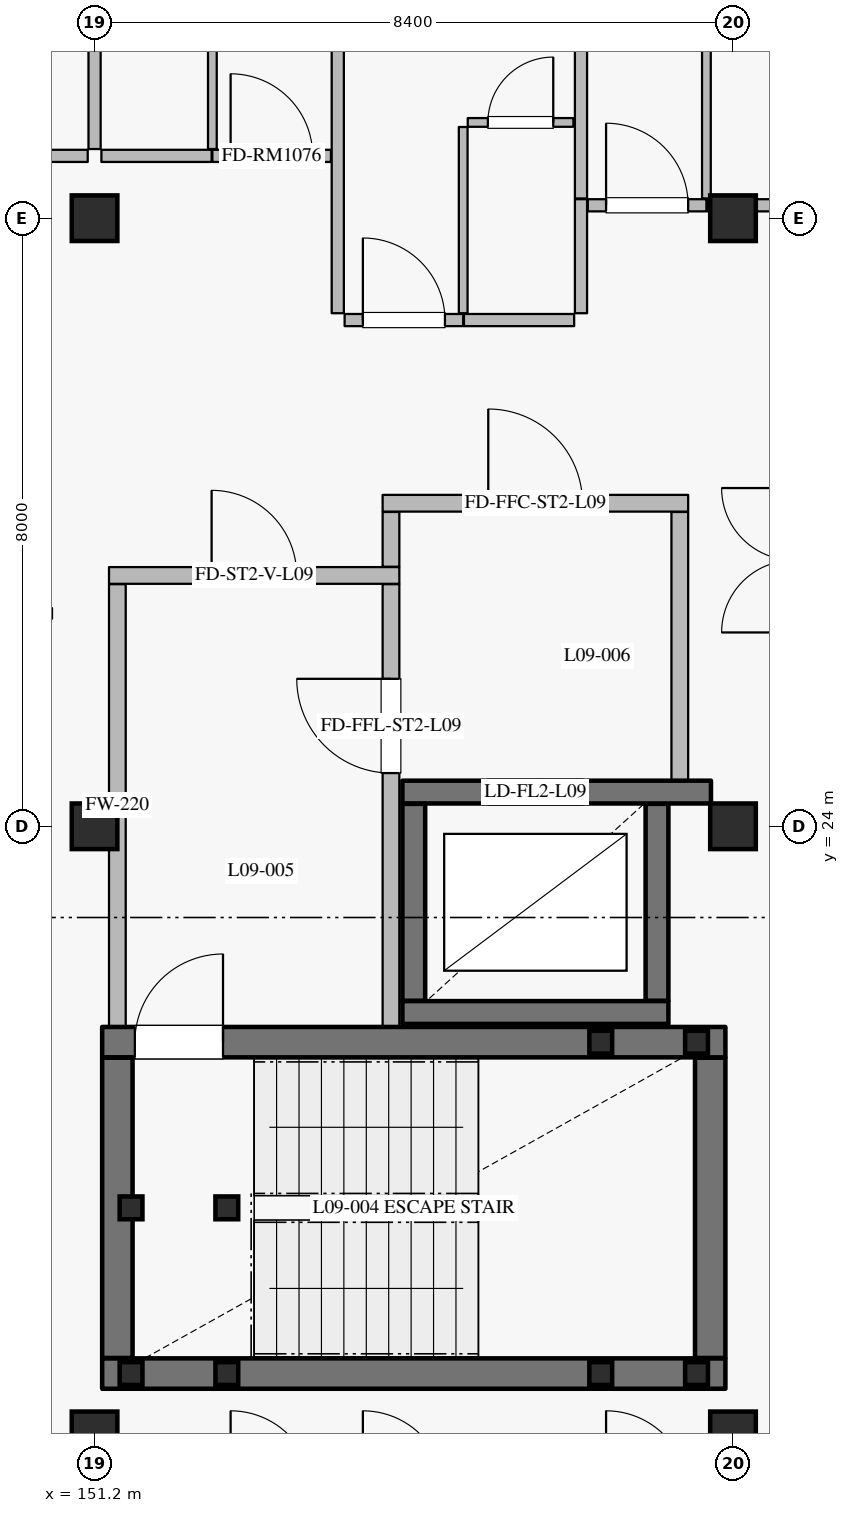
"""IFC4 building model, lengths in metres.
Left out: names, types, materials, properties, quantities, classifications, styles, units other than length and angle.
Written with IfcOpenShell. Run it as: python <this file> out.ifc"""

import sys

from ifc_helpers import new_model, si_unit, direction, frame, frame_2d, origin, origin_2d, place, context, subcontext, project, spatial, rectangle, hollow_rectangle, extrude, element, fill, save


model = new_model("IFC4")
c1 = context("Model", 3, precision=1e-05, world=origin(), true_north=direction((0.0, 1.0)))
c2 = subcontext(c1, "Body", "Model", "MODEL_VIEW")
j1 = project(units=[si_unit("LENGTHUNIT", "METRE"), si_unit("PLANEANGLEUNIT", "RADIAN")], contexts=[c1])
p1 = place(None, origin())
s1 = spatial("IfcSite", under=j1, at=p1, CompositionType="ELEMENT")
p2 = place(p1, origin())
s2 = spatial("IfcBuilding", under=s1, at=p2, CompositionType="ELEMENT")
p3 = place(p2, frame((0.0, 0.0, 39.6)))
s3 = spatial("IfcBuildingStorey", under=s2, at=p3, CompositionType="ELEMENT", Elevation=39.6)
for number, where, z_axis, x_axis in (
    (1, (151.2, 24.0, 0.0), (0.0, 0.0, 1.0), (1.0, 0.0, 0.0)),
    (2, (159.6, 24.0, 0.0), (0.0, 0.0, 1.0), (1.0, 0.0, 0.0)),
    (3, (151.2, 16.0, 0.0), (0.0, 0.0, 1.0), (1.0, 0.0, 0.0)),
    (4, (151.2, 32.0, 0.0), (0.0, 0.0, 1.0), (1.0, 0.0, 0.0)),
    (5, (159.6, 16.0, 0.0), (0.0, 0.0, 1.0), (1.0, 0.0, 0.0)),
    (6, (159.6, 32.0, 0.0), (0.0, 0.0, 1.0), (1.0, 0.0, 0.0)),
):
    element("IfcColumn", number, at=place(p3, frame(where, z_axis=z_axis, x_axis=x_axis)), inside=s3, PredefinedType="COLUMN", context=c2, shape_type="SweptSolid", body=[
        extrude(rectangle(XDim=0.6, YDim=0.6, at=origin_2d()), origin(), (0.0, 0.0, 1.0), 3.6),
    ])
p4 = place(p3, frame((143.1, 32.286, 0.0), z_axis=(0.0, 0.0, 1.0), x_axis=(0.724145477467, 0.689647248573, 0.0)))
e7 = element("IfcWall", 7, at=p4, inside=s3, PredefinedType="SOLIDWALL", context=c2, shape_type="SweptSolid", body=[
    extrude(rectangle(XDim=10.771, YDim=0.24, at=frame_2d((5.385, 0.0))), origin(), (0.0, 0.0, 1.0), 2.94),
])
p5 = place(p4, frame((0.194, 0.0, 0.8)))
e8 = element("IfcOpeningElement", 8, at=p5, cuts=e7, PredefinedType="OPENING", context=c2, shape_type="SweptSolid", body=[
    extrude(rectangle(XDim=1.6, YDim=1.6, at=frame_2d((0.8, 0.8))), frame((0.0, 0.13, 0.0), z_axis=(0.0, -1.0, 0.0), x_axis=(1.0, 0.0, 0.0)), (0.0, 0.0, 1.0), 0.26),
])
p6 = place(p4, frame((3.591, 0.0, 0.8)))
e9 = element("IfcOpeningElement", 9, at=p6, cuts=e7, PredefinedType="OPENING", context=c2, shape_type="SweptSolid", body=[
    extrude(rectangle(XDim=1.6, YDim=1.6, at=frame_2d((0.8, 0.8))), frame((0.0, 0.13, 0.0), z_axis=(0.0, -1.0, 0.0), x_axis=(1.0, 0.0, 0.0)), (0.0, 0.0, 1.0), 0.26),
])
p7 = place(p4, frame((7.983, 0.0, 0.8)))
e10 = element("IfcOpeningElement", 10, at=p7, cuts=e7, PredefinedType="OPENING", context=c2, shape_type="SweptSolid", body=[
    extrude(rectangle(XDim=1.6, YDim=1.6, at=frame_2d((0.8, 0.8))), frame((0.0, 0.13, 0.0), z_axis=(0.0, -1.0, 0.0), x_axis=(1.0, 0.0, 0.0)), (0.0, 0.0, 1.0), 0.26),
])
p8 = place(p3, frame((155.25, 21.55, 0.0), z_axis=(0.0, 0.0, 1.0), x_axis=(1.0, 0.0, 0.0)))
e11 = element("IfcWall", 11, at=p8, inside=s3, PredefinedType="SHEAR", context=c2, shape_type="SweptSolid", body=[
    extrude(rectangle(XDim=3.5, YDim=0.3, at=frame_2d((1.75, 0.0))), origin(), (0.0, 0.0, 1.0), 3.335),
])
p9 = place(p3, frame((158.6, 21.705, 0.0), z_axis=(0.0, 0.0, 1.0), x_axis=(0.0, 1.0, 0.0)))
e12 = element("IfcWall", 12, at=p9, inside=s3, PredefinedType="SHEAR", context=c2, shape_type="SweptSolid", body=[
    extrude(rectangle(XDim=2.59, YDim=0.3, at=frame_2d((1.295, 0.0))), origin(), (0.0, 0.0, 1.0), 3.335),
])
p10 = place(p3, frame((159.31, 24.45, 0.0), z_axis=(0.0, 0.0, 1.0), x_axis=(-1.0, 0.0, 0.0)))
e13 = element("IfcWall", 13, at=p10, inside=s3, PredefinedType="SHEAR", context=c2, shape_type="SweptSolid", body=[
    extrude(rectangle(XDim=4.06, YDim=0.3, at=frame_2d((2.03, 0.0))), origin(), (0.0, 0.0, 1.0), 3.335),
])
p11 = place(p10, frame((1.685, 0.0, 0.0)))
e14 = element("IfcOpeningElement", 14, at=p11, cuts=e13, PredefinedType="OPENING", context=c2, shape_type="SweptSolid", body=[
    extrude(rectangle(XDim=1.25, YDim=2.25, at=frame_2d((0.625, 1.125))), frame((0.0, 0.16, 0.0), z_axis=(0.0, -1.0, 0.0), x_axis=(1.0, 0.0, 0.0)), (0.0, 0.0, 1.0), 0.32),
])
p12 = place(p3, frame((155.4, 24.295, 0.0), z_axis=(0.0, 0.0, 1.0), x_axis=(0.0, -1.0, 0.0)))
e15 = element("IfcWall", 15, at=p12, inside=s3, PredefinedType="SHEAR", context=c2, shape_type="SweptSolid", body=[
    extrude(rectangle(XDim=2.59, YDim=0.3, at=frame_2d((1.295, 0.0))), origin(), (0.0, 0.0, 1.0), 3.335),
])
p13 = place(p3, frame((151.3, 16.8, 0.0), z_axis=(0.0, 0.0, 1.0), x_axis=(1.0, 0.0, 0.0)))
e16 = element("IfcWall", 16, at=p13, inside=s3, PredefinedType="SHEAR", context=c2, shape_type="SweptSolid", body=[
    extrude(rectangle(XDim=8.2, YDim=0.4, at=frame_2d((4.1, 0.0))), origin(), (0.0, 0.0, 1.0), 3.335),
])
p14 = place(p3, frame((159.3, 17.005, 0.0), z_axis=(0.0, 0.0, 1.0), x_axis=(0.0, 1.0, 0.0)))
e17 = element("IfcWall", 17, at=p14, inside=s3, PredefinedType="SHEAR", context=c2, shape_type="SweptSolid", body=[
    extrude(rectangle(XDim=3.95, YDim=0.4, at=frame_2d((1.975, 0.0))), origin(), (0.0, 0.0, 1.0), 3.335),
])
p15 = place(p3, frame((151.3, 21.16, 0.0), z_axis=(0.0, 0.0, 1.0), x_axis=(1.0, 0.0, 0.0)))
e18 = element("IfcWall", 18, at=p15, inside=s3, PredefinedType="SHEAR", context=c2, shape_type="SweptSolid", body=[
    extrude(rectangle(XDim=8.2, YDim=0.4, at=frame_2d((4.1, 0.0))), origin(), (0.0, 0.0, 1.0), 3.335),
])
p16 = place(p15, frame((0.43, 0.0, 0.0)))
e19 = element("IfcOpeningElement", 19, at=p16, cuts=e18, PredefinedType="OPENING", context=c2, shape_type="SweptSolid", body=[
    extrude(rectangle(XDim=1.16, YDim=2.2, at=frame_2d((0.58, 1.1))), frame((0.0, 0.21, 0.0), z_axis=(0.0, -1.0, 0.0), x_axis=(1.0, 0.0, 0.0)), (0.0, 0.0, 1.0), 0.42),
])
p17 = place(p3, frame((151.5, 17.005, 0.0), z_axis=(0.0, 0.0, 1.0), x_axis=(0.0, 1.0, 0.0)))
e20 = element("IfcWall", 20, at=p17, inside=s3, PredefinedType="SHEAR", context=c2, shape_type="SweptSolid", body=[
    extrude(rectangle(XDim=3.95, YDim=0.4, at=frame_2d((1.975, 0.0))), origin(), (0.0, 0.0, 1.0), 3.335),
])
p18 = place(p3, frame((151.5, 21.365, 0.0), z_axis=(0.0, 0.0, 1.0), x_axis=(0.0, 1.0, 0.0)))
e21 = element("IfcWall", 21, at=p18, inside=s3, PredefinedType="PARTITIONING", context=c2, shape_type="SweptSolid", body=[
    extrude(rectangle(XDim=5.82, YDim=0.22, at=frame_2d((2.91, 0.0))), origin(), (0.0, 0.0, 1.0), 3.335),
])
p19 = place(p3, frame((151.39, 27.3, 0.0), z_axis=(0.0, 0.0, 1.0), x_axis=(1.0, 0.0, 0.0)))
e22 = element("IfcWall", 22, at=p19, inside=s3, PredefinedType="PARTITIONING", context=c2, shape_type="SweptSolid", body=[
    extrude(rectangle(XDim=3.82, YDim=0.22, at=frame_2d((1.91, 0.0))), origin(), (0.0, 0.0, 1.0), 3.335),
])
p20 = place(p19, frame((1.35, 0.0, 0.0)))
e23 = element("IfcOpeningElement", 23, at=p20, cuts=e22, PredefinedType="OPENING", context=c2, shape_type="SweptSolid", body=[
    extrude(rectangle(XDim=1.12, YDim=2.2, at=frame_2d((0.56, 1.1))), frame((0.0, 0.12, 0.0), z_axis=(0.0, -1.0, 0.0), x_axis=(1.0, 0.0, 0.0)), (0.0, 0.0, 1.0), 0.24),
])
p21 = place(p3, frame((155.1, 21.365, 0.0), z_axis=(0.0, 0.0, 1.0), x_axis=(0.0, 1.0, 0.0)))
e24 = element("IfcWall", 24, at=p21, inside=s3, PredefinedType="PARTITIONING", context=c2, shape_type="SweptSolid", body=[
    extrude(rectangle(XDim=5.82, YDim=0.22, at=frame_2d((2.91, 0.0))), origin(), (0.0, 0.0, 1.0), 3.335),
])
p22 = place(p21, frame((3.335, 0.0, 0.0)))
e25 = element("IfcOpeningElement", 25, at=p22, cuts=e24, PredefinedType="OPENING", context=c2, shape_type="SweptSolid", body=[
    extrude(rectangle(XDim=1.24, YDim=2.2, at=frame_2d((0.62, 1.1))), frame((0.0, 0.12, 0.0), z_axis=(0.0, -1.0, 0.0), x_axis=(1.0, 0.0, 0.0)), (0.0, 0.0, 1.0), 0.24),
])
p23 = place(p3, frame((155.1, 27.415, 0.0), z_axis=(0.0, 0.0, 1.0), x_axis=(0.0, 1.0, 0.0)))
e26 = element("IfcWall", 26, at=p23, inside=s3, PredefinedType="PARTITIONING", context=c2, shape_type="SweptSolid", body=[
    extrude(rectangle(XDim=0.72, YDim=0.22, at=frame_2d((0.36, 0.0))), origin(), (0.0, 0.0, 1.0), 3.335),
])
p24 = place(p3, frame((158.9, 24.605, 0.0), z_axis=(0.0, 0.0, 1.0), x_axis=(0.0, 1.0, 0.0)))
e27 = element("IfcWall", 27, at=p24, inside=s3, PredefinedType="PARTITIONING", context=c2, shape_type="SweptSolid", body=[
    extrude(rectangle(XDim=3.53, YDim=0.22, at=frame_2d((1.765, 0.0))), origin(), (0.0, 0.0, 1.0), 3.335),
])
p25 = place(p3, frame((154.99, 28.25, 0.0), z_axis=(0.0, 0.0, 1.0), x_axis=(1.0, 0.0, 0.0)))
e28 = element("IfcWall", 28, at=p25, inside=s3, PredefinedType="PARTITIONING", context=c2, shape_type="SweptSolid", body=[
    extrude(rectangle(XDim=4.02, YDim=0.22, at=frame_2d((2.01, 0.0))), origin(), (0.0, 0.0, 1.0), 3.335),
])
p26 = place(p25, frame((1.39, 0.0, 0.0)))
e29 = element("IfcOpeningElement", 29, at=p26, cuts=e28, PredefinedType="OPENING", context=c2, shape_type="SweptSolid", body=[
    extrude(rectangle(XDim=1.24, YDim=2.2, at=frame_2d((0.62, 1.1))), frame((0.0, 0.12, 0.0), z_axis=(0.0, -1.0, 0.0), x_axis=(1.0, 0.0, 0.0)), (0.0, 0.0, 1.0), 0.24),
])
for number, where, z_axis, x_axis in (
    (30, (151.68, 16.8, 0.0), (0.0, 0.0, 1.0), (1.0, 0.0, 0.0)),
    (31, (151.68, 18.98, 0.0), (0.0, 0.0, 1.0), (1.0, 0.0, 0.0)),
    (32, (152.94, 16.8, 0.0), (0.0, 0.0, 1.0), (1.0, 0.0, 0.0)),
    (33, (152.94, 18.98, 0.0), (0.0, 0.0, 1.0), (1.0, 0.0, 0.0)),
    (34, (157.86, 16.8, -1.8), (0.0, 0.0, 1.0), (1.0, 0.0, 0.0)),
    (35, (157.86, 21.16, -1.8), (0.0, 0.0, 1.0), (1.0, 0.0, 0.0)),
    (36, (159.12, 16.8, -1.8), (0.0, 0.0, 1.0), (1.0, 0.0, 0.0)),
    (37, (159.12, 21.16, -1.8), (0.0, 0.0, 1.0), (1.0, 0.0, 0.0)),
):
    element("IfcColumn", number, at=place(p3, frame(where, z_axis=z_axis, x_axis=x_axis)), inside=s3, PredefinedType="COLUMN", context=c2, shape_type="SweptSolid", body=[
        extrude(hollow_rectangle(XDim=0.3, YDim=0.3, WallThickness=0.012, at=origin_2d()), origin(), (0.0, 0.0, 1.0), 3.42),
    ])
p27 = place(p3, frame((149.64, 32.82, 0.0), z_axis=(0.0, 0.0, 1.0), x_axis=(1.0, 0.0, 0.0)))
e38 = element("IfcWall", 38, at=p27, inside=s3, PredefinedType="PARTITIONING", context=c2, shape_type="SweptSolid", body=[
    extrude(rectangle(XDim=1.47, YDim=0.16, at=frame_2d((0.735, 0.0))), origin(), (0.0, 0.0, 1.0), 3.335),
])
p28 = place(p3, frame((151.29, 32.82, 0.0), z_axis=(0.0, 0.0, 1.0), x_axis=(1.0, 0.0, 0.0)))
e39 = element("IfcWall", 39, at=p28, inside=s3, PredefinedType="PARTITIONING", context=c2, shape_type="SweptSolid", body=[
    extrude(rectangle(XDim=1.45, YDim=0.16, at=frame_2d((0.725, 0.0))), origin(), (0.0, 0.0, 1.0), 3.335),
])
p29 = place(p3, frame((152.75, 32.82, 0.0), z_axis=(0.0, 0.0, 1.0), x_axis=(1.0, 0.0, 0.0)))
e40 = element("IfcWall", 40, at=p29, inside=s3, PredefinedType="PARTITIONING", context=c2, shape_type="SweptSolid", body=[
    extrude(rectangle(XDim=1.56, YDim=0.16, at=frame_2d((0.78, 0.0))), origin(), (0.0, 0.0, 1.0), 3.335),
])
p30 = place(p29, frame((0.24, 0.0, 0.0)))
e41 = element("IfcOpeningElement", 41, at=p30, cuts=e40, PredefinedType="OPENING", context=c2, shape_type="SweptSolid", body=[
    extrude(rectangle(XDim=1.08, YDim=2.3, at=frame_2d((0.54, 1.15))), frame((0.0, 0.09, 0.0), z_axis=(0.0, -1.0, 0.0), x_axis=(1.0, 0.0, 0.0)), (0.0, 0.0, 1.0), 0.18),
])
p31 = place(p3, frame((152.75, 32.91, 0.0), z_axis=(0.0, 0.0, 1.0), x_axis=(0.0, 1.0, 0.0)))
e42 = element("IfcWall", 42, at=p31, inside=s3, PredefinedType="PARTITIONING", context=c2, shape_type="SweptSolid", body=[
    extrude(rectangle(XDim=2.45, YDim=0.115, at=frame_2d((1.225, 0.0))), origin(), (0.0, 0.0, 1.0), 3.335),
])
p32 = place(p3, frame((151.2, 32.91, 0.0), z_axis=(0.0, 0.0, 1.0), x_axis=(0.0, 1.0, 0.0)))
e43 = element("IfcWall", 43, at=p32, inside=s3, PredefinedType="PARTITIONING", context=c2, shape_type="SweptSolid", body=[
    extrude(rectangle(XDim=6.75, YDim=0.16, at=frame_2d((3.375, 0.0))), origin(), (0.0, 0.0, 1.0), 2.74),
])
p33 = place(p3, frame((154.49, 30.66, 0.0), z_axis=(0.0, 0.0, 1.0), x_axis=(1.0, 0.0, 0.0)))
e44 = element("IfcWall", 44, at=p33, inside=s3, PredefinedType="PARTITIONING", context=c2, shape_type="SweptSolid", body=[
    extrude(rectangle(XDim=1.56, YDim=0.16, at=frame_2d((0.78, 0.0))), origin(), (0.0, 0.0, 1.0), 3.335),
])
p34 = place(p33, frame((0.24, 0.0, 0.0)))
e45 = element("IfcOpeningElement", 45, at=p34, cuts=e44, PredefinedType="OPENING", context=c2, shape_type="SweptSolid", body=[
    extrude(rectangle(XDim=1.08, YDim=2.3, at=frame_2d((0.54, 1.15))), frame((0.0, 0.09, 0.0), z_axis=(0.0, -1.0, 0.0), x_axis=(1.0, 0.0, 0.0)), (0.0, 0.0, 1.0), 0.18),
])
p35 = place(p3, frame((156.06, 30.66, 0.0), z_axis=(0.0, 0.0, 1.0), x_axis=(1.0, 0.0, 0.0)))
e46 = element("IfcWall", 46, at=p35, inside=s3, PredefinedType="PARTITIONING", context=c2, shape_type="SweptSolid", body=[
    extrude(rectangle(XDim=1.45, YDim=0.16, at=frame_2d((0.725, 0.0))), origin(), (0.0, 0.0, 1.0), 3.335),
])
p36 = place(p3, frame((156.05, 30.75, 0.0), z_axis=(0.0, 0.0, 1.0), x_axis=(0.0, 1.0, 0.0)))
e47 = element("IfcWall", 47, at=p36, inside=s3, PredefinedType="PARTITIONING", context=c2, shape_type="SweptSolid", body=[
    extrude(rectangle(XDim=2.45, YDim=0.115, at=frame_2d((1.225, 0.0))), origin(), (0.0, 0.0, 1.0), 3.335),
])
p37 = place(p3, frame((156.11, 33.26, 0.0), z_axis=(0.0, 0.0, 1.0), x_axis=(1.0, 0.0, 0.0)))
e48 = element("IfcWall", 48, at=p37, inside=s3, PredefinedType="PARTITIONING", context=c2, shape_type="SweptSolid", body=[
    extrude(rectangle(XDim=1.39, YDim=0.115, at=frame_2d((0.695, 0.0))), origin(), (0.0, 0.0, 1.0), 3.335),
])
p38 = place(p37, frame((0.265, 0.0, 0.0)))
e49 = element("IfcOpeningElement", 49, at=p38, cuts=e48, PredefinedType="OPENING", context=c2, shape_type="SweptSolid", body=[
    extrude(rectangle(XDim=0.86, YDim=2.12, at=frame_2d((0.43, 1.06))), frame((0.0, 0.067, 0.0), z_axis=(0.0, -1.0, 0.0), x_axis=(1.0, 0.0, 0.0)), (0.0, 0.0, 1.0), 0.135),
])
p39 = place(p3, frame((154.4, 30.75, 0.0), z_axis=(0.0, 0.0, 1.0), x_axis=(0.0, 1.0, 0.0)))
e50 = element("IfcWall", 50, at=p39, inside=s3, PredefinedType="PARTITIONING", context=c2, shape_type="SweptSolid", body=[
    extrude(rectangle(XDim=8.91, YDim=0.16, at=frame_2d((4.455, 0.0))), origin(), (0.0, 0.0, 1.0), 3.335),
])
p40 = place(p3, frame((157.6, 30.75, 0.0), z_axis=(0.0, 0.0, 1.0), x_axis=(0.0, 1.0, 0.0)))
e51 = element("IfcWall", 51, at=p40, inside=s3, PredefinedType="PARTITIONING", context=c2, shape_type="SweptSolid", body=[
    extrude(rectangle(XDim=1.5, YDim=0.16, at=frame_2d((0.75, 0.0))), origin(), (0.0, 0.0, 1.0), 3.335),
])
p41 = place(p3, frame((157.69, 32.17, 0.0), z_axis=(0.0, 0.0, 1.0), x_axis=(1.0, 0.0, 0.0)))
e52 = element("IfcWall", 52, at=p41, inside=s3, PredefinedType="PARTITIONING", context=c2, shape_type="SweptSolid", body=[
    extrude(rectangle(XDim=1.56, YDim=0.16, at=frame_2d((0.78, 0.0))), origin(), (0.0, 0.0, 1.0), 2.84),
])
p42 = place(p41, frame((0.24, 0.0, 0.0)))
e53 = element("IfcOpeningElement", 53, at=p42, cuts=e52, PredefinedType="OPENING", context=c2, shape_type="SweptSolid", body=[
    extrude(rectangle(XDim=1.08, YDim=2.3, at=frame_2d((0.54, 1.15))), frame((0.0, 0.09, 0.0), z_axis=(0.0, -1.0, 0.0), x_axis=(1.0, 0.0, 0.0)), (0.0, 0.0, 1.0), 0.18),
])
p43 = place(p3, frame((159.26, 32.17, 0.0), z_axis=(0.0, 0.0, 1.0), x_axis=(1.0, 0.0, 0.0)))
e54 = element("IfcWall", 54, at=p43, inside=s3, PredefinedType="PARTITIONING", context=c2, shape_type="SweptSolid", body=[
    extrude(rectangle(XDim=1.45, YDim=0.16, at=frame_2d((0.725, 0.0))), origin(), (0.0, 0.0, 1.0), 3.335),
])
p44 = place(p3, frame((159.25, 32.26, 0.0), z_axis=(0.0, 0.0, 1.0), x_axis=(0.0, 1.0, 0.0)))
e55 = element("IfcWall", 55, at=p44, inside=s3, PredefinedType="PARTITIONING", context=c2, shape_type="SweptSolid", body=[
    extrude(rectangle(XDim=2.45, YDim=0.115, at=frame_2d((1.225, 0.0))), origin(), (0.0, 0.0, 1.0), 3.335),
])
p45 = place(p3, frame((157.6, 32.26, 0.0), z_axis=(0.0, 0.0, 1.0), x_axis=(0.0, 1.0, 0.0)))
e56 = element("IfcWall", 56, at=p45, inside=s3, PredefinedType="PARTITIONING", context=c2, shape_type="SweptSolid", body=[
    extrude(rectangle(XDim=7.4, YDim=0.16, at=frame_2d((3.7, 0.0))), origin(), (0.0, 0.0, 1.0), 3.335),
])
p46 = place(p11, origin())
e57 = element("IfcDoor", 57, at=p46, inside=s3, OperationType="DOUBLE_DOOR_SLIDING", PredefinedType="DOOR", context=c2, shape_type="SweptSolid", body=[
    extrude(rectangle(XDim=1.25, YDim=2.25, at=frame_2d((0.625, 1.125))), frame((0.0, 0.025, 0.0), z_axis=(0.0, -1.0, 0.0), x_axis=(1.0, 0.0, 0.0)), (0.0, 0.0, 1.0), 0.05),
])
fill(e14, e57)
p47 = place(p16, origin())
e58 = element("IfcDoor", 58, at=p47, inside=s3, OperationType="SINGLE_SWING_RIGHT", PredefinedType="DOOR", context=c2, shape_type="SweptSolid", body=[
    extrude(rectangle(XDim=1.16, YDim=2.2, at=frame_2d((0.58, 1.1))), frame((0.0, 0.025, 0.0), z_axis=(0.0, -1.0, 0.0), x_axis=(1.0, 0.0, 0.0)), (0.0, 0.0, 1.0), 0.05),
])
fill(e19, e58)
p48 = place(p20, origin())
e59 = element("IfcDoor", 59, at=p48, inside=s3, OperationType="SINGLE_SWING_LEFT", PredefinedType="DOOR", context=c2, shape_type="SweptSolid", body=[
    extrude(rectangle(XDim=1.12, YDim=2.2, at=frame_2d((0.56, 1.1))), frame((0.0, 0.025, 0.0), z_axis=(0.0, -1.0, 0.0), x_axis=(1.0, 0.0, 0.0)), (0.0, 0.0, 1.0), 0.05),
])
fill(e23, e59)
p49 = place(p22, origin())
e60 = element("IfcDoor", 60, at=p49, inside=s3, OperationType="SINGLE_SWING_RIGHT", PredefinedType="DOOR", context=c2, shape_type="SweptSolid", body=[
    extrude(rectangle(XDim=1.24, YDim=2.2, at=frame_2d((0.62, 1.1))), frame((0.0, 0.025, 0.0), z_axis=(0.0, -1.0, 0.0), x_axis=(1.0, 0.0, 0.0)), (0.0, 0.0, 1.0), 0.05),
])
fill(e25, e60)
p50 = place(p26, origin())
e61 = element("IfcDoor", 61, at=p50, inside=s3, OperationType="SINGLE_SWING_LEFT", PredefinedType="DOOR", context=c2, shape_type="SweptSolid", body=[
    extrude(rectangle(XDim=1.24, YDim=2.2, at=frame_2d((0.62, 1.1))), frame((0.0, 0.025, 0.0), z_axis=(0.0, -1.0, 0.0), x_axis=(1.0, 0.0, 0.0)), (0.0, 0.0, 1.0), 0.05),
])
fill(e29, e61)
p51 = place(p30, origin())
e62 = element("IfcDoor", 62, at=p51, inside=s3, OperationType="SINGLE_SWING_LEFT", PredefinedType="DOOR", context=c2, shape_type="SweptSolid", body=[
    extrude(rectangle(XDim=1.08, YDim=2.3, at=frame_2d((0.54, 1.15))), frame((0.0, 0.025, 0.0), z_axis=(0.0, -1.0, 0.0), x_axis=(1.0, 0.0, 0.0)), (0.0, 0.0, 1.0), 0.05),
])
fill(e41, e62)
p52 = place(p34, origin())
e63 = element("IfcDoor", 63, at=p52, inside=s3, OperationType="SINGLE_SWING_LEFT", PredefinedType="DOOR", context=c2, shape_type="SweptSolid", body=[
    extrude(rectangle(XDim=1.08, YDim=2.3, at=frame_2d((0.54, 1.15))), frame((0.0, 0.025, 0.0), z_axis=(0.0, -1.0, 0.0), x_axis=(1.0, 0.0, 0.0)), (0.0, 0.0, 1.0), 0.05),
])
fill(e45, e63)
p53 = place(p38, origin())
e64 = element("IfcDoor", 64, at=p53, inside=s3, OperationType="SINGLE_SWING_RIGHT", PredefinedType="DOOR", context=c2, shape_type="SweptSolid", body=[
    extrude(rectangle(XDim=0.86, YDim=2.12, at=frame_2d((0.43, 1.06))), frame((0.0, 0.025, 0.0), z_axis=(0.0, -1.0, 0.0), x_axis=(1.0, 0.0, 0.0)), (0.0, 0.0, 1.0), 0.05),
])
fill(e49, e64)
p54 = place(p42, origin())
e65 = element("IfcDoor", 65, at=p54, inside=s3, OperationType="SINGLE_SWING_LEFT", PredefinedType="DOOR", context=c2, shape_type="SweptSolid", body=[
    extrude(rectangle(XDim=1.08, YDim=2.3, at=frame_2d((0.54, 1.15))), frame((0.0, 0.025, 0.0), z_axis=(0.0, -1.0, 0.0), x_axis=(1.0, 0.0, 0.0)), (0.0, 0.0, 1.0), 0.05),
])
fill(e53, e65)
save(model, sys.argv[1])
